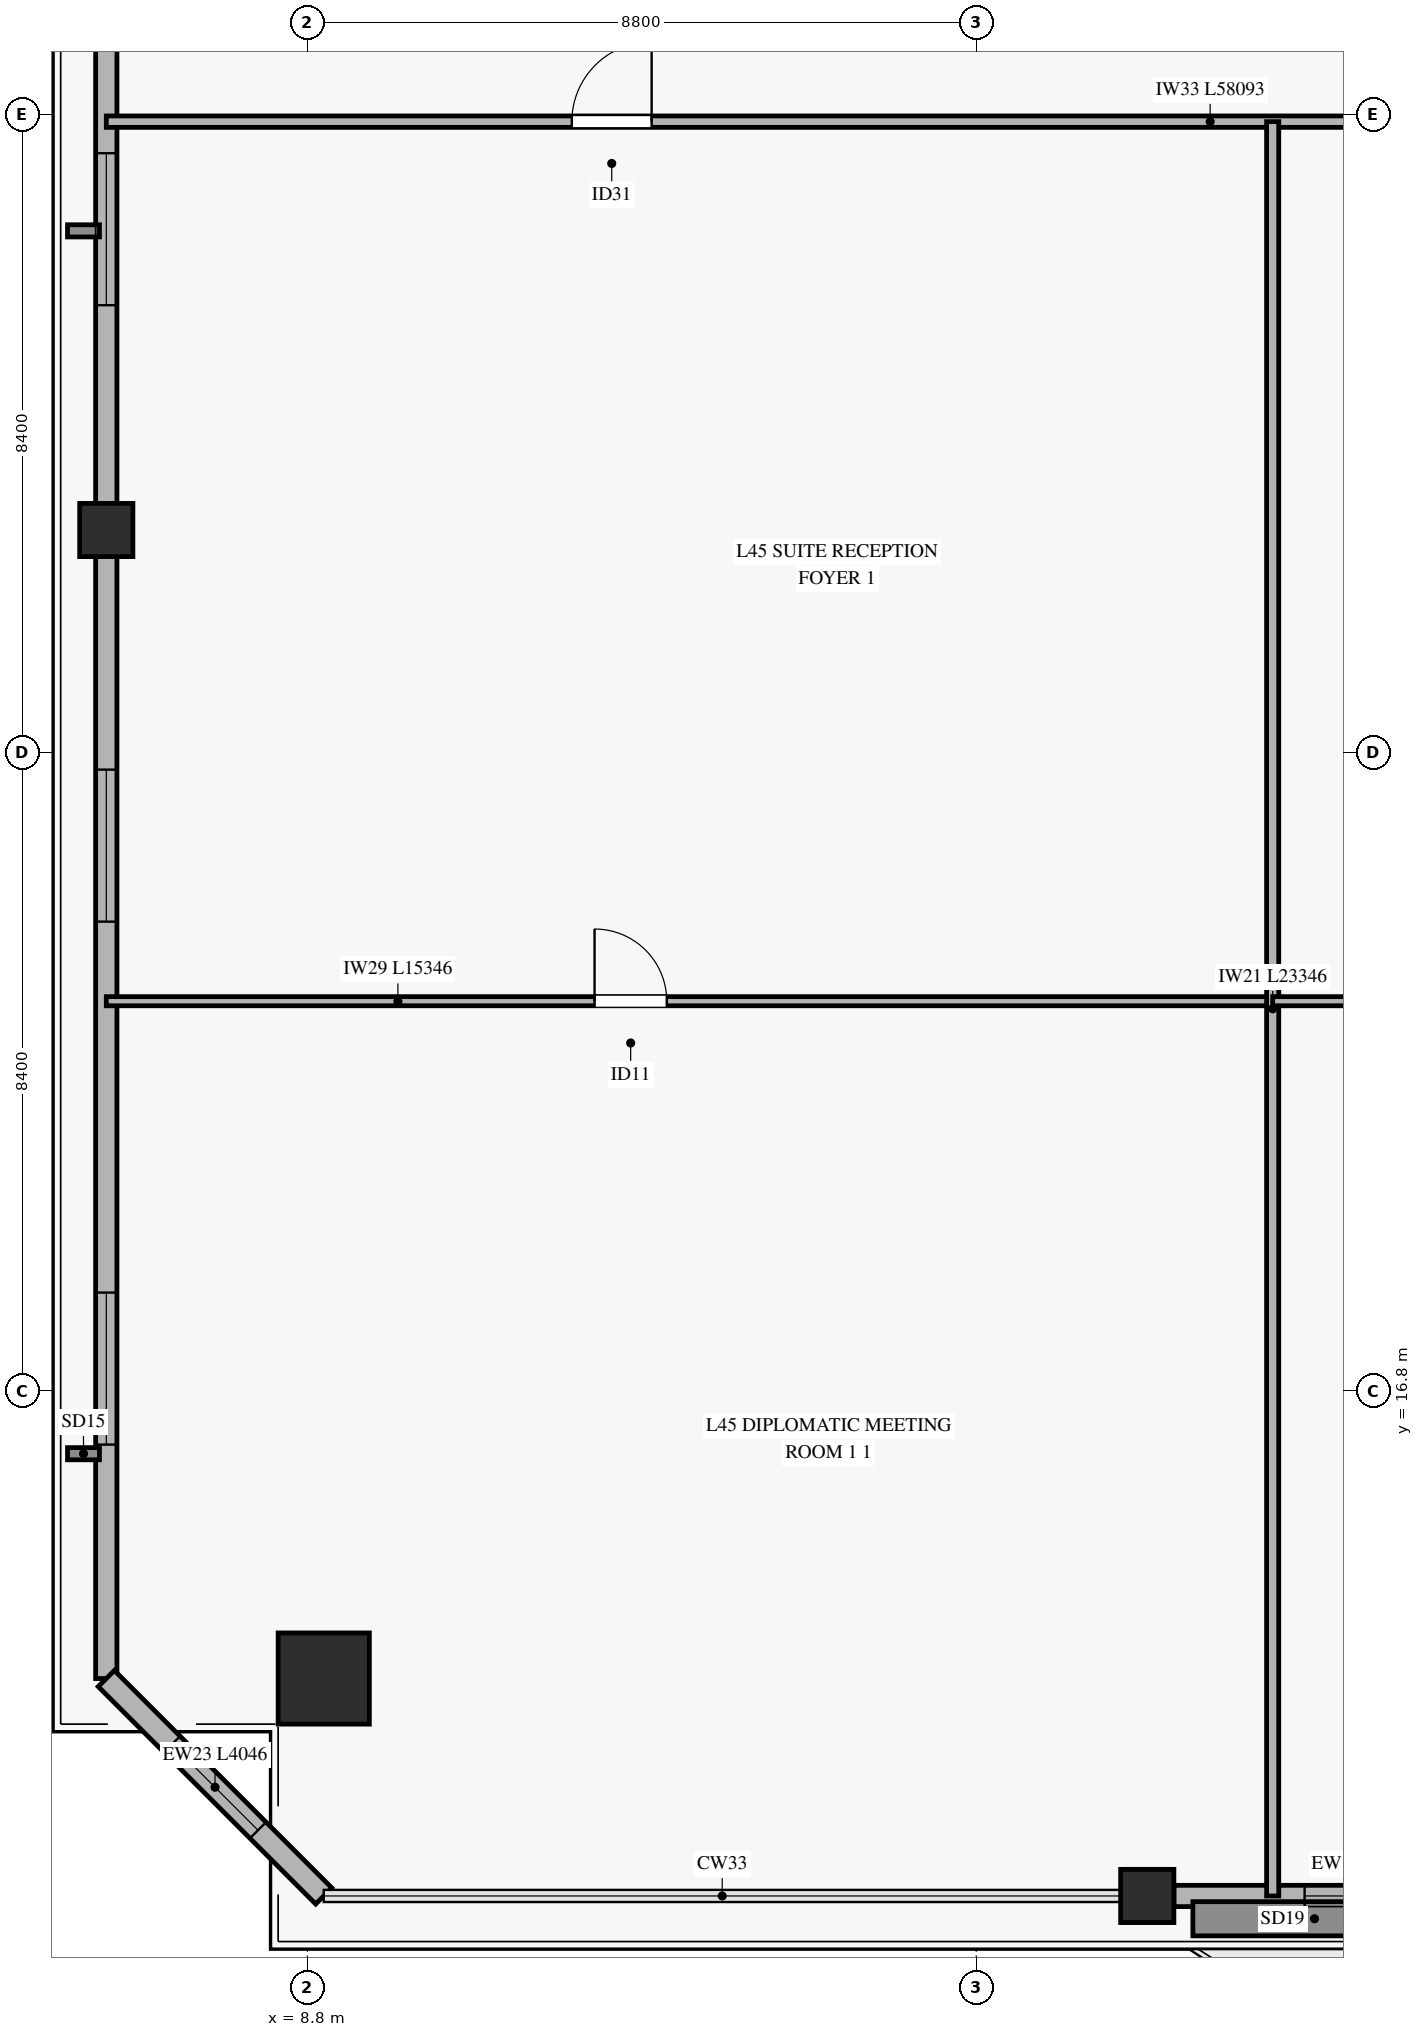
"""IFC4 building model, lengths in metres.
Left out: names, types, materials, properties, quantities, classifications, styles, units other than length and angle.
Written with IfcOpenShell. Run it as: python <this file> out.ifc"""

import sys

from ifc_helpers import new_model, si_unit, direction, frame, frame_2d, origin, origin_2d, place, context, subcontext, project, spatial, rectangle, hollow_rectangle, extrude, source, transform, mapped, element, fill, save


model = new_model("IFC4")
c1 = context("Model", 3, precision=1e-05, world=origin(), true_north=direction((0.0, 1.0)))
c2 = subcontext(c1, "Body", "Model", "MODEL_VIEW")
j1 = project(units=[si_unit("LENGTHUNIT", "METRE"), si_unit("PLANEANGLEUNIT", "RADIAN")], contexts=[c1])
p1 = place(None, origin())
s1 = spatial("IfcSite", under=j1, at=p1, CompositionType="ELEMENT")
p2 = place(p1, origin())
s2 = spatial("IfcBuilding", under=s1, at=p2, CompositionType="ELEMENT")
p3 = place(p2, frame((0.0, 0.0, 180.7)))
s3 = spatial("IfcBuildingStorey", under=s2, at=p3, CompositionType="ELEMENT", Elevation=180.7)
m1 = source(origin(), c2, "Body", "SweptSolid", [
    extrude(hollow_rectangle(XDim=1.2, YDim=1.2, WallThickness=0.055, at=origin_2d()), origin(), (0.0, 0.0, 1.0), 3.27),
])
p4 = place(p3, frame((9.015, 13.015, 0.0), z_axis=(0.0, 0.0, 1.0), x_axis=(1.0, 0.0, 0.0)))
e1 = element("IfcColumn", 1, at=p4, inside=s3, PredefinedType="COLUMN", context=c2, shape_type="MappedRepresentation", body=[
    mapped(m1, transform((0.0, 0.0, 0.0), x_axis=(1.0, 0.0, 0.0), y_axis=(0.0, 1.0, 0.0), z_axis=(0.0, 0.0, 1.0), scale=1.0)),
])
m2 = source(origin(), c2, "Body", "SweptSolid", [
    extrude(hollow_rectangle(XDim=0.7, YDim=0.7, WallThickness=0.032, at=origin_2d()), origin(), (0.0, 0.0, 1.0), 3.27),
])
for number, where, z_axis, x_axis in (
    (2, (19.85, 10.154, 0.0), (0.0, 0.0, 1.0), (1.0, 0.0, 0.0)),
    (3, (6.154, 28.127, 0.0), (0.0, 0.0, 1.0), (1.0, 0.0, 0.0)),
):
    element("IfcColumn", number, at=place(p3, frame(where, z_axis=z_axis, x_axis=x_axis)), inside=s3, PredefinedType="COLUMN", context=c2, shape_type="MappedRepresentation", body=[
        mapped(m2, transform((0.0, 0.0, 0.0), x_axis=(1.0, 0.0, 0.0), y_axis=(0.0, 1.0, 0.0), z_axis=(0.0, 0.0, 1.0), scale=1.0)),
    ])
p5 = place(p3, frame((20.2, 10.154, 0.0), z_axis=(0.0, 0.0, 1.0), x_axis=(1.0, 0.0, 0.0)))
e4 = element("IfcWall", 4, at=p5, inside=s3, PredefinedType="SOLIDWALL", context=c2, shape_type="SweptSolid", body=[
    extrude(rectangle(XDim=10.25, YDim=0.28, at=frame_2d((5.125, 0.0))), origin(), (0.0, 0.0, 1.0), 2.75),
])
p6 = place(p5, frame((4.2, 0.0, 0.0)))
e5 = element("IfcOpeningElement", 5, at=p6, cuts=e4, PredefinedType="OPENING", context=c2, shape_type="SweptSolid", body=[
    extrude(rectangle(XDim=1.8, YDim=2.25, at=frame_2d((0.9, 1.125))), frame((0.0, 0.15, 0.0), z_axis=(0.0, -1.0, 0.0), x_axis=(1.0, 0.0, 0.0)), (0.0, 0.0, 1.0), 0.3),
])
p7 = place(p5, frame((1.72, 0.0, 0.45)))
e6 = element("IfcOpeningElement", 6, at=p7, cuts=e4, PredefinedType="OPENING", context=c2, shape_type="SweptSolid", body=[
    extrude(rectangle(XDim=2.0, YDim=2.0, at=frame_2d((1.0, 1.0))), frame((0.0, 0.15, 0.0), z_axis=(0.0, -1.0, 0.0), x_axis=(1.0, 0.0, 0.0)), (0.0, 0.0, 1.0), 0.3),
])
p8 = place(p5, frame((7.62, 0.0, 0.45)))
e7 = element("IfcOpeningElement", 7, at=p8, cuts=e4, PredefinedType="OPENING", context=c2, shape_type="SweptSolid", body=[
    extrude(rectangle(XDim=1.6, YDim=2.0, at=frame_2d((0.8, 1.0))), frame((0.0, 0.15, 0.0), z_axis=(0.0, -1.0, 0.0), x_axis=(1.0, 0.0, 0.0)), (0.0, 0.0, 1.0), 0.3),
])
p9 = place(p3, frame((6.154, 13.015, 0.0), z_axis=(0.0, 0.0, 1.0), x_axis=(0.0, 1.0, 0.0)))
e8 = element("IfcWall", 8, at=p9, inside=s3, PredefinedType="SOLIDWALL", context=c2, shape_type="SweptSolid", body=[
    extrude(rectangle(XDim=14.762, YDim=0.28, at=frame_2d((7.381, 0.0))), origin(), (0.0, 0.0, 1.0), 2.75),
])
p10 = place(p9, frame((3.078, 0.0, 0.45)))
e9 = element("IfcOpeningElement", 9, at=p10, cuts=e8, PredefinedType="OPENING", context=c2, shape_type="SweptSolid", body=[
    extrude(rectangle(XDim=2.0, YDim=2.0, at=frame_2d((1.0, 1.0))), frame((0.0, 0.15, 0.0), z_axis=(0.0, -1.0, 0.0), x_axis=(1.0, 0.0, 0.0)), (0.0, 0.0, 1.0), 0.3),
])
p11 = place(p9, frame((9.959, 0.0, 0.45)))
e10 = element("IfcOpeningElement", 10, at=p11, cuts=e8, PredefinedType="OPENING", context=c2, shape_type="SweptSolid", body=[
    extrude(rectangle(XDim=2.0, YDim=2.0, at=frame_2d((1.0, 1.0))), frame((0.0, 0.15, 0.0), z_axis=(0.0, -1.0, 0.0), x_axis=(1.0, 0.0, 0.0)), (0.0, 0.0, 1.0), 0.3),
])
p12 = place(p3, frame((6.154, 28.477, 0.0), z_axis=(0.0, 0.0, 1.0), x_axis=(0.0, 1.0, 0.0)))
e11 = element("IfcWall", 11, at=p12, inside=s3, PredefinedType="SOLIDWALL", context=c2, shape_type="SweptSolid", body=[
    extrude(rectangle(XDim=14.762, YDim=0.28, at=frame_2d((7.381, 0.0))), origin(), (0.0, 0.0, 1.0), 2.75),
])
p13 = place(p12, frame((2.608, 0.0, 0.45)))
e12 = element("IfcOpeningElement", 12, at=p13, cuts=e11, PredefinedType="OPENING", context=c2, shape_type="SweptSolid", body=[
    extrude(rectangle(XDim=2.0, YDim=2.0, at=frame_2d((1.0, 1.0))), frame((0.0, 0.15, 0.0), z_axis=(0.0, -1.0, 0.0), x_axis=(1.0, 0.0, 0.0)), (0.0, 0.0, 1.0), 0.3),
])
p14 = place(p3, frame((6.154, 13.015, 0.0), z_axis=(0.0, 0.0, 1.0), x_axis=(0.707106781187, -0.707106781187, 0.0)))
e13 = element("IfcWall", 13, at=p14, inside=s3, PredefinedType="SOLIDWALL", context=c2, shape_type="SweptSolid", body=[
    extrude(rectangle(XDim=4.046, YDim=0.3, at=frame_2d((2.023, 0.0))), origin(), (0.0, 0.0, 1.0), 2.75),
])
p15 = place(p14, frame((1.223, 0.0, 0.45)))
e14 = element("IfcOpeningElement", 14, at=p15, cuts=e13, PredefinedType="OPENING", context=c2, shape_type="SweptSolid", body=[
    extrude(rectangle(XDim=1.6, YDim=2.0, at=frame_2d((0.8, 1.0))), frame((0.0, 0.16, 0.0), z_axis=(0.0, -1.0, 0.0), x_axis=(1.0, 0.0, 0.0)), (0.0, 0.0, 1.0), 0.32),
])
p16 = place(p3, frame((6.154, 33.5, 0.0), z_axis=(0.0, 0.0, 1.0), x_axis=(1.0, 0.0, 0.0)))
e15 = element("IfcWall", 15, at=p16, inside=s3, PredefinedType="PARTITIONING", context=c2, shape_type="SweptSolid", body=[
    extrude(rectangle(XDim=58.093, YDim=0.15, at=frame_2d((29.046, 0.0))), origin(), (0.0, 0.0, 1.0), 2.455),
])
p17 = place(p16, frame((6.125, 0.0, 0.0)))
e16 = element("IfcOpeningElement", 16, at=p17, cuts=e15, PredefinedType="OPENING", context=c2, shape_type="SweptSolid", body=[
    extrude(rectangle(XDim=1.05, YDim=2.15, at=frame_2d((0.525, 1.075))), frame((0.0, 0.085, 0.0), z_axis=(0.0, -1.0, 0.0), x_axis=(1.0, 0.0, 0.0)), (0.0, 0.0, 1.0), 0.17),
])
p18 = place(p16, frame((17.757, 0.0, 0.0)))
e17 = element("IfcOpeningElement", 17, at=p18, cuts=e15, PredefinedType="OPENING", context=c2, shape_type="SweptSolid", body=[
    extrude(rectangle(XDim=1.05, YDim=2.15, at=frame_2d((0.525, 1.075))), frame((0.0, 0.085, 0.0), z_axis=(0.0, -1.0, 0.0), x_axis=(1.0, 0.0, 0.0)), (0.0, 0.0, 1.0), 0.17),
])
p19 = place(p16, frame((23.087, 0.0, 0.0)))
e18 = element("IfcOpeningElement", 18, at=p19, cuts=e15, PredefinedType="OPENING", context=c2, shape_type="SweptSolid", body=[
    extrude(rectangle(XDim=1.05, YDim=2.15, at=frame_2d((0.525, 1.075))), frame((0.0, 0.085, 0.0), z_axis=(0.0, -1.0, 0.0), x_axis=(1.0, 0.0, 0.0)), (0.0, 0.0, 1.0), 0.17),
])
p20 = place(p16, frame((27.762, 0.0, 0.0)))
e19 = element("IfcOpeningElement", 19, at=p20, cuts=e15, PredefinedType="OPENING", context=c2, shape_type="SweptSolid", body=[
    extrude(rectangle(XDim=1.05, YDim=2.15, at=frame_2d((0.525, 1.075))), frame((0.0, 0.085, 0.0), z_axis=(0.0, -1.0, 0.0), x_axis=(1.0, 0.0, 0.0)), (0.0, 0.0, 1.0), 0.17),
])
p21 = place(p16, frame((32.162, 0.0, 0.0)))
e20 = element("IfcOpeningElement", 20, at=p21, cuts=e15, PredefinedType="OPENING", context=c2, shape_type="SweptSolid", body=[
    extrude(rectangle(XDim=1.05, YDim=2.15, at=frame_2d((0.525, 1.075))), frame((0.0, 0.085, 0.0), z_axis=(0.0, -1.0, 0.0), x_axis=(1.0, 0.0, 0.0)), (0.0, 0.0, 1.0), 0.17),
])
p22 = place(p16, frame((36.642, 0.0, 0.0)))
e21 = element("IfcOpeningElement", 21, at=p22, cuts=e15, PredefinedType="OPENING", context=c2, shape_type="SweptSolid", body=[
    extrude(rectangle(XDim=1.05, YDim=2.15, at=frame_2d((0.525, 1.075))), frame((0.0, 0.085, 0.0), z_axis=(0.0, -1.0, 0.0), x_axis=(1.0, 0.0, 0.0)), (0.0, 0.0, 1.0), 0.17),
])
p23 = place(p16, frame((46.377, 0.0, 0.0)))
e22 = element("IfcOpeningElement", 22, at=p23, cuts=e15, PredefinedType="OPENING", context=c2, shape_type="SweptSolid", body=[
    extrude(rectangle(XDim=1.05, YDim=2.15, at=frame_2d((0.525, 1.075))), frame((0.0, 0.085, 0.0), z_axis=(0.0, -1.0, 0.0), x_axis=(1.0, 0.0, 0.0)), (0.0, 0.0, 1.0), 0.17),
])
p24 = place(p3, frame((6.154, 21.927, 0.0), z_axis=(0.0, 0.0, 1.0), x_axis=(1.0, 0.0, 0.0)))
e23 = element("IfcWall", 23, at=p24, inside=s3, PredefinedType="PARTITIONING", context=c2, shape_type="SweptSolid", body=[
    extrude(rectangle(XDim=15.346, YDim=0.12, at=frame_2d((7.673, 0.0))), origin(), (0.0, 0.0, 1.0), 2.455),
])
p25 = place(p24, frame((6.424, 0.0, 0.0)))
e24 = element("IfcOpeningElement", 24, at=p25, cuts=e23, PredefinedType="OPENING", context=c2, shape_type="SweptSolid", body=[
    extrude(rectangle(XDim=0.95, YDim=2.1, at=frame_2d((0.475, 1.05))), frame((0.0, 0.07, 0.0), z_axis=(0.0, -1.0, 0.0), x_axis=(1.0, 0.0, 0.0)), (0.0, 0.0, 1.0), 0.14),
])
p26 = place(p3, frame((21.5, 10.154, 0.0), z_axis=(0.0, 0.0, 1.0), x_axis=(0.0, 1.0, 0.0)))
e25 = element("IfcWall", 25, at=p26, inside=s3, PredefinedType="PARTITIONING", context=c2, shape_type="SweptSolid", body=[
    extrude(rectangle(XDim=23.346, YDim=0.16, at=frame_2d((11.673, 0.0))), origin(), (0.0, 0.0, 1.0), 2.755),
])
p27 = place(p3, frame((21.5, 21.927, 0.0), z_axis=(0.0, 0.0, 1.0), x_axis=(1.0, 0.0, 0.0)))
e26 = element("IfcWall", 26, at=p27, inside=s3, PredefinedType="PARTITIONING", context=c2, shape_type="SweptSolid", body=[
    extrude(rectangle(XDim=5.9, YDim=0.12, at=frame_2d((2.95, 0.0))), origin(), (0.0, 0.0, 1.0), 3.27),
])
p28 = place(p27, frame((2.526, 0.0, 0.0)))
e27 = element("IfcOpeningElement", 27, at=p28, cuts=e26, PredefinedType="OPENING", context=c2, shape_type="SweptSolid", body=[
    extrude(rectangle(XDim=0.95, YDim=2.1, at=frame_2d((0.475, 1.05))), frame((0.0, 0.07, 0.0), z_axis=(0.0, -1.0, 0.0), x_axis=(1.0, 0.0, 0.0)), (0.0, 0.0, 1.0), 0.14),
])
m3 = source(origin(), c2, "Body", "SweptSolid", [
    extrude(rectangle(XDim=2.0, YDim=2.0, at=frame_2d((1.0, 1.0))), frame((0.0, 0.03, 0.0), z_axis=(0.0, -1.0, 0.0), x_axis=(1.0, 0.0, 0.0)), (0.0, 0.0, 1.0), 0.06),
])
p29 = place(p7, origin())
e28 = element("IfcWindow", 28, at=p29, inside=s3, PartitioningType="SINGLE_PANEL", PredefinedType="WINDOW", context=c2, shape_type="MappedRepresentation", body=[
    mapped(m3, transform((0.0, 0.0, 0.0), x_axis=(1.0, 0.0, 0.0), y_axis=(0.0, 1.0, 0.0), z_axis=(0.0, 0.0, 1.0), scale=1.0)),
])
fill(e6, e28)
p30 = place(p10, origin())
e29 = element("IfcWindow", 29, at=p30, inside=s3, PartitioningType="SINGLE_PANEL", PredefinedType="WINDOW", context=c2, shape_type="MappedRepresentation", body=[
    mapped(m3, transform((0.0, 0.0, 0.0), x_axis=(1.0, 0.0, 0.0), y_axis=(0.0, 1.0, 0.0), z_axis=(0.0, 0.0, 1.0), scale=1.0)),
])
fill(e9, e29)
p31 = place(p11, origin())
e30 = element("IfcWindow", 30, at=p31, inside=s3, PartitioningType="SINGLE_PANEL", PredefinedType="WINDOW", context=c2, shape_type="MappedRepresentation", body=[
    mapped(m3, transform((0.0, 0.0, 0.0), x_axis=(1.0, 0.0, 0.0), y_axis=(0.0, 1.0, 0.0), z_axis=(0.0, 0.0, 1.0), scale=1.0)),
])
fill(e10, e30)
p32 = place(p13, origin())
e31 = element("IfcWindow", 31, at=p32, inside=s3, PartitioningType="SINGLE_PANEL", PredefinedType="WINDOW", context=c2, shape_type="MappedRepresentation", body=[
    mapped(m3, transform((0.0, 0.0, 0.0), x_axis=(1.0, 0.0, 0.0), y_axis=(0.0, 1.0, 0.0), z_axis=(0.0, 0.0, 1.0), scale=1.0)),
])
fill(e12, e31)
m4 = source(origin(), c2, "Body", "SweptSolid", [
    extrude(rectangle(XDim=1.6, YDim=2.0, at=frame_2d((0.8, 1.0))), frame((0.0, 0.03, 0.0), z_axis=(0.0, -1.0, 0.0), x_axis=(1.0, 0.0, 0.0)), (0.0, 0.0, 1.0), 0.06),
])
p33 = place(p15, origin())
e32 = element("IfcWindow", 32, at=p33, inside=s3, PartitioningType="SINGLE_PANEL", PredefinedType="WINDOW", context=c2, shape_type="MappedRepresentation", body=[
    mapped(m4, transform((0.0, 0.0, 0.0), x_axis=(1.0, 0.0, 0.0), y_axis=(0.0, 1.0, 0.0), z_axis=(0.0, 0.0, 1.0), scale=1.0)),
])
fill(e14, e32)
m5 = source(origin(), c2, "Body", "SweptSolid", [
    extrude(rectangle(XDim=1.05, YDim=2.15, at=frame_2d((0.525, 1.075))), frame((0.0, 0.025, 0.0), z_axis=(0.0, -1.0, 0.0), x_axis=(1.0, 0.0, 0.0)), (0.0, 0.0, 1.0), 0.05),
])
p34 = place(p17, origin())
e33 = element("IfcDoor", 33, at=p34, inside=s3, OperationType="SINGLE_SWING_RIGHT", PredefinedType="DOOR", context=c2, shape_type="MappedRepresentation", body=[
    mapped(m5, transform((0.0, 0.0, 0.0), x_axis=(1.0, 0.0, 0.0), y_axis=(0.0, 1.0, 0.0), z_axis=(0.0, 0.0, 1.0), scale=1.0)),
])
fill(e16, e33)
m6 = source(origin(), c2, "Body", "SweptSolid", [
    extrude(rectangle(XDim=0.95, YDim=2.1, at=frame_2d((0.475, 1.05))), frame((0.0, 0.025, 0.0), z_axis=(0.0, -1.0, 0.0), x_axis=(1.0, 0.0, 0.0)), (0.0, 0.0, 1.0), 0.05),
])
p35 = place(p25, origin())
e34 = element("IfcDoor", 34, at=p35, inside=s3, OperationType="SINGLE_SWING_LEFT", PredefinedType="DOOR", context=c2, shape_type="MappedRepresentation", body=[
    mapped(m6, transform((0.0, 0.0, 0.0), x_axis=(1.0, 0.0, 0.0), y_axis=(0.0, 1.0, 0.0), z_axis=(0.0, 0.0, 1.0), scale=1.0)),
])
fill(e24, e34)
save(model, sys.argv[1])
